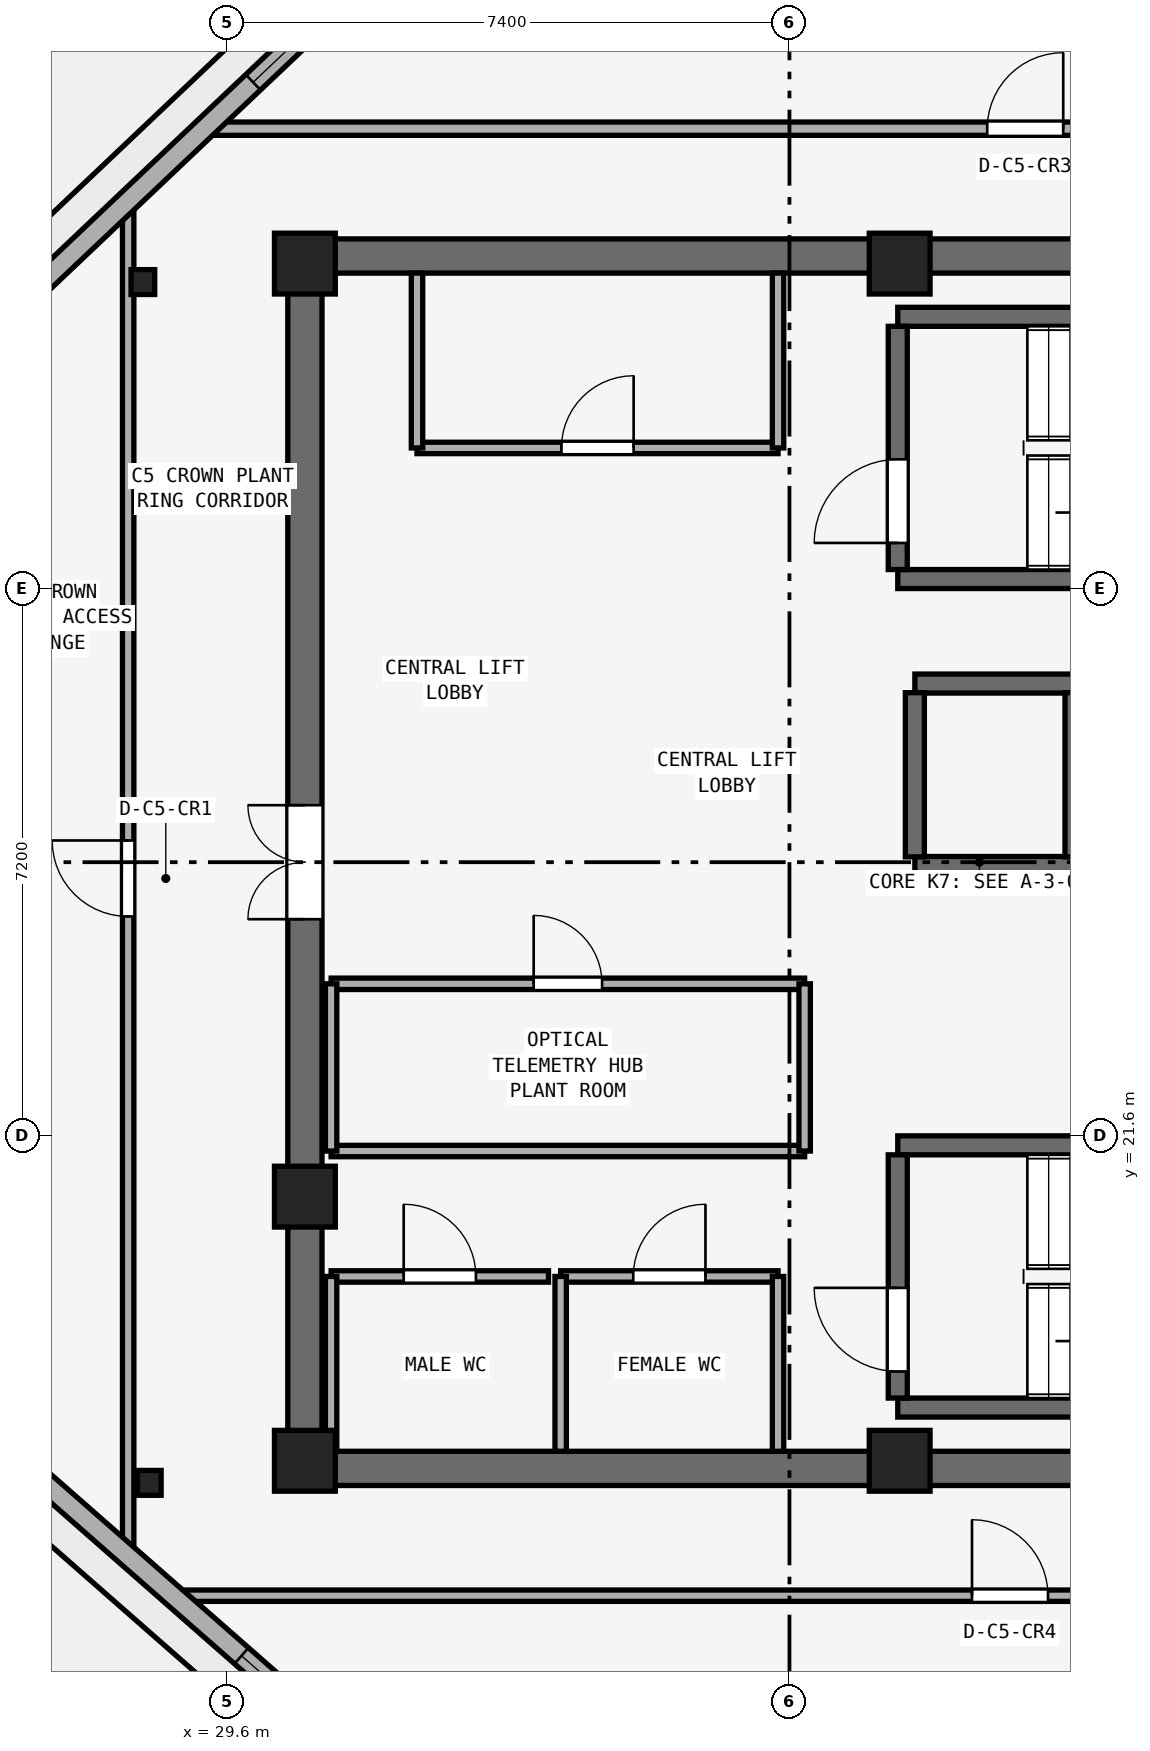
"""IFC4 building model, lengths in metres.
Left out: names, types, materials, properties, quantities, classifications, styles, units other than length and angle.
Written with IfcOpenShell. Run it as: python <this file> out.ifc"""

import sys

from ifc_helpers import new_model, si_unit, direction, frame, frame_2d, origin, origin_2d, place, context, subcontext, project, spatial, rectangle, i_section, extrude, element, fill, save


model = new_model("IFC4")
c1 = context("Model", 3, precision=1e-05, world=origin(), true_north=direction((0.0, 1.0)))
c2 = subcontext(c1, "Body", "Model", "MODEL_VIEW")
j1 = project(units=[si_unit("LENGTHUNIT", "METRE"), si_unit("PLANEANGLEUNIT", "RADIAN")], contexts=[c1])
p1 = place(None, origin())
s1 = spatial("IfcSite", under=j1, at=p1, CompositionType="ELEMENT")
p2 = place(p1, origin())
s2 = spatial("IfcBuilding", under=s1, at=p2, CompositionType="ELEMENT")
p3 = place(p2, frame((0.0, 0.0, 329.4)))
s3 = spatial("IfcBuildingStorey", under=s2, at=p3, CompositionType="ELEMENT", Elevation=329.4)
for number, where, z_axis, x_axis in (
    (1, (30.4, 17.225, 0.0), (0.0, 0.0, 1.0), (1.0, 0.0, 0.0)),
    (2, (30.4, 33.175, 0.0), (0.0, 0.0, 1.0), (1.0, 0.0, 0.0)),
):
    element("IfcWall", number, at=place(p3, frame(where, z_axis=z_axis, x_axis=x_axis)), inside=s3, PredefinedType="SHEAR", context=c2, shape_type="SweptSolid", body=[
        extrude(rectangle(XDim=18.2, YDim=0.45, at=frame_2d((9.1, 0.0))), origin(), (0.0, 0.0, 1.0), 3.72),
    ])
p4 = place(p3, frame((30.625, 17.45, 0.0), z_axis=(0.0, 0.0, 1.0), x_axis=(0.0, 1.0, 0.0)))
e3 = element("IfcWall", 3, at=p4, inside=s3, PredefinedType="SHEAR", context=c2, shape_type="SweptSolid", body=[
    extrude(rectangle(XDim=15.5, YDim=0.45, at=frame_2d((7.75, 0.0))), origin(), (0.0, 0.0, 1.0), 3.72),
])
p5 = place(p4, frame((7.0, 0.0, 0.0)))
e4 = element("IfcOpeningElement", 4, at=p5, cuts=e3, PredefinedType="OPENING", context=c2, shape_type="SweptSolid", body=[
    extrude(rectangle(XDim=1.5, YDim=2.15, at=frame_2d((0.75, 1.075))), frame((0.0, 0.235, 0.0), z_axis=(0.0, -1.0, 0.0), x_axis=(1.0, 0.0, 0.0)), (0.0, 0.0, 1.0), 0.47),
])
for number, where, z_axis, x_axis in (
    (5, (30.625, 17.325, 0.0), (0.0, 0.0, 1.0), (1.0, 0.0, 0.0)),
    (6, (38.45, 17.325, 0.0), (0.0, 0.0, 1.0), (1.0, 0.0, 0.0)),
    (7, (38.45, 33.075, 0.0), (0.0, 0.0, 1.0), (1.0, 0.0, 0.0)),
    (8, (30.625, 33.075, 0.0), (0.0, 0.0, 1.0), (1.0, 0.0, 0.0)),
    (9, (30.625, 20.8, 0.0), (0.0, 0.0, 1.0), (1.0, 0.0, 0.0)),
):
    element("IfcColumn", number, at=place(p3, frame(where, z_axis=z_axis, x_axis=x_axis)), inside=s3, PredefinedType="PILASTER", context=c2, shape_type="SweptSolid", body=[
        extrude(rectangle(XDim=0.8, YDim=0.8, at=origin_2d()), origin(), (0.0, 0.0, 1.0), 4.0),
    ])
for number, where, z_axis, x_axis in (
    (10, (28.493, 32.832, 0.0), (0.0, 0.0, 1.0), (1.0, 0.0, 0.0)),
    (11, (28.578, 17.035, 0.0), (0.0, 0.0, 1.0), (1.0, 0.0, 0.0)),
):
    element("IfcColumn", number, at=place(p3, frame(where, z_axis=z_axis, x_axis=x_axis)), inside=s3, PredefinedType="COLUMN", context=c2, shape_type="SweptSolid", body=[
        extrude(i_section(OverallWidth=0.311, OverallDepth=0.327, WebThickness=0.016, FlangeThickness=0.025, at=origin_2d()), origin(), (0.0, 0.0, 1.0), 4.0),
    ])
for number, where, z_axis, x_axis in (
    (12, (38.425, 28.925, 0.0), (0.0, 0.0, 1.0), (1.0, 0.0, 0.0)),
    (13, (38.425, 32.375, 0.0), (0.0, 0.0, 1.0), (1.0, 0.0, 0.0)),
):
    element("IfcWall", number, at=place(p3, frame(where, z_axis=z_axis, x_axis=x_axis)), inside=s3, PredefinedType="SHEAR", context=c2, shape_type="SweptSolid", body=[
        extrude(rectangle(XDim=7.3, YDim=0.25, at=frame_2d((3.65, 0.0))), origin(), (0.0, 0.0, 1.0), 3.72),
    ])
p6 = place(p3, frame((38.425, 29.05, 0.0), z_axis=(0.0, 0.0, 1.0), x_axis=(0.0, 1.0, 0.0)))
e14 = element("IfcWall", 14, at=p6, inside=s3, PredefinedType="SHEAR", context=c2, shape_type="SweptSolid", body=[
    extrude(rectangle(XDim=3.2, YDim=0.25, at=frame_2d((1.6, 0.0))), origin(), (0.0, 0.0, 1.0), 3.72),
])
p7 = place(p6, frame((0.35, 0.0, 0.0)))
e15 = element("IfcOpeningElement", 15, at=p7, cuts=e14, PredefinedType="OPENING", context=c2, shape_type="SweptSolid", body=[
    extrude(rectangle(XDim=1.1, YDim=2.15, at=frame_2d((0.55, 1.075))), frame((0.0, 0.135, 0.0), z_axis=(0.0, -1.0, 0.0), x_axis=(1.0, 0.0, 0.0)), (0.0, 0.0, 1.0), 0.27),
])
for number, where, z_axis, x_axis in (
    (16, (38.425, 18.025, 0.0), (0.0, 0.0, 1.0), (1.0, 0.0, 0.0)),
    (17, (38.425, 21.475, 0.0), (0.0, 0.0, 1.0), (1.0, 0.0, 0.0)),
):
    element("IfcWall", number, at=place(p3, frame(where, z_axis=z_axis, x_axis=x_axis)), inside=s3, PredefinedType="SHEAR", context=c2, shape_type="SweptSolid", body=[
        extrude(rectangle(XDim=7.3, YDim=0.25, at=frame_2d((3.65, 0.0))), origin(), (0.0, 0.0, 1.0), 3.72),
    ])
p8 = place(p3, frame((38.425, 18.15, 0.0), z_axis=(0.0, 0.0, 1.0), x_axis=(0.0, 1.0, 0.0)))
e18 = element("IfcWall", 18, at=p8, inside=s3, PredefinedType="SHEAR", context=c2, shape_type="SweptSolid", body=[
    extrude(rectangle(XDim=3.2, YDim=0.25, at=frame_2d((1.6, 0.0))), origin(), (0.0, 0.0, 1.0), 3.72),
])
p9 = place(p8, frame((0.35, 0.0, 0.0)))
e19 = element("IfcOpeningElement", 19, at=p9, cuts=e18, PredefinedType="OPENING", context=c2, shape_type="SweptSolid", body=[
    extrude(rectangle(XDim=1.1, YDim=2.15, at=frame_2d((0.55, 1.075))), frame((0.0, 0.135, 0.0), z_axis=(0.0, -1.0, 0.0), x_axis=(1.0, 0.0, 0.0)), (0.0, 0.0, 1.0), 0.27),
])
for number, where, z_axis, x_axis in (
    (20, (38.65, 25.15, 0.0), (0.0, 0.0, 1.0), (1.0, 0.0, 0.0)),
    (21, (38.65, 27.55, 0.0), (0.0, 0.0, 1.0), (1.0, 0.0, 0.0)),
):
    element("IfcWall", number, at=place(p3, frame(where, z_axis=z_axis, x_axis=x_axis)), inside=s3, PredefinedType="SHEAR", context=c2, shape_type="SweptSolid", body=[
        extrude(rectangle(XDim=2.1, YDim=0.25, at=frame_2d((1.05, 0.0))), origin(), (0.0, 0.0, 1.0), 3.72),
    ])
for number, where, z_axis, x_axis in (
    (22, (38.65, 25.27, 0.0), (0.0, 0.0, 1.0), (0.0, 1.0, 0.0)),
    (23, (40.75, 25.27, 0.0), (0.0, 0.0, 1.0), (0.0, 1.0, 0.0)),
):
    element("IfcWall", number, at=place(p3, frame(where, z_axis=z_axis, x_axis=x_axis)), inside=s3, PredefinedType="SHEAR", context=c2, shape_type="SweptSolid", body=[
        extrude(rectangle(XDim=2.16, YDim=0.25, at=frame_2d((1.08, 0.0))), origin(), (0.0, 0.0, 1.0), 3.72),
    ])
p10 = place(p3, frame((32.1, 30.65, 0.0), z_axis=(0.0, 0.0, 1.0), x_axis=(1.0, 0.0, 0.0)))
e24 = element("IfcWall", 24, at=p10, inside=s3, PredefinedType="PARTITIONING", context=c2, shape_type="SweptSolid", body=[
    extrude(rectangle(XDim=4.75, YDim=0.15, at=frame_2d((2.375, 0.0))), origin(), (0.0, 0.0, 1.0), 3.72),
])
p11 = place(p10, frame((1.9, 0.0, 0.0)))
e25 = element("IfcOpeningElement", 25, at=p11, cuts=e24, PredefinedType="OPENING", context=c2, shape_type="SweptSolid", body=[
    extrude(rectangle(XDim=0.95, YDim=2.1, at=frame_2d((0.475, 1.05))), frame((0.0, 0.085, 0.0), z_axis=(0.0, -1.0, 0.0), x_axis=(1.0, 0.0, 0.0)), (0.0, 0.0, 1.0), 0.17),
])
for number, where, z_axis, x_axis in (
    (26, (32.1, 30.65, 0.0), (0.0, 0.0, 1.0), (0.0, 1.0, 0.0)),
    (27, (36.85, 30.65, 0.0), (0.0, 0.0, 1.0), (0.0, 1.0, 0.0)),
):
    element("IfcWall", number, at=place(p3, frame(where, z_axis=z_axis, x_axis=x_axis)), inside=s3, PredefinedType="PARTITIONING", context=c2, shape_type="SweptSolid", body=[
        extrude(rectangle(XDim=2.3, YDim=0.15, at=frame_2d((1.15, 0.0))), origin(), (0.0, 0.0, 1.0), 3.72),
    ])
p12 = place(p3, frame((30.97, 19.75, 0.0), z_axis=(0.0, 0.0, 1.0), x_axis=(1.0, 0.0, 0.0)))
e28 = element("IfcWall", 28, at=p12, inside=s3, PredefinedType="PARTITIONING", context=c2, shape_type="SweptSolid", body=[
    extrude(rectangle(XDim=2.86, YDim=0.15, at=frame_2d((1.43, 0.0))), origin(), (0.0, 0.0, 1.0), 3.72),
])
p13 = place(p12, frame((0.955, 0.0, 0.0)))
e29 = element("IfcOpeningElement", 29, at=p13, cuts=e28, PredefinedType="OPENING", context=c2, shape_type="SweptSolid", body=[
    extrude(rectangle(XDim=0.95, YDim=2.1, at=frame_2d((0.475, 1.05))), frame((0.0, 0.085, 0.0), z_axis=(0.0, -1.0, 0.0), x_axis=(1.0, 0.0, 0.0)), (0.0, 0.0, 1.0), 0.17),
])
p14 = place(p3, frame((30.97, 17.45, 0.0), z_axis=(0.0, 0.0, 1.0), x_axis=(0.0, 1.0, 0.0)))
e30 = element("IfcWall", 30, at=p14, inside=s3, PredefinedType="PARTITIONING", context=c2, shape_type="SweptSolid", body=[
    extrude(rectangle(XDim=2.3, YDim=0.15, at=frame_2d((1.15, 0.0))), origin(), (0.0, 0.0, 1.0), 2.82),
])
p15 = place(p3, frame((33.99, 19.75, 0.0), z_axis=(0.0, 0.0, 1.0), x_axis=(1.0, 0.0, 0.0)))
e31 = element("IfcWall", 31, at=p15, inside=s3, PredefinedType="PARTITIONING", context=c2, shape_type="SweptSolid", body=[
    extrude(rectangle(XDim=2.86, YDim=0.15, at=frame_2d((1.43, 0.0))), origin(), (0.0, 0.0, 1.0), 3.72),
])
p16 = place(p15, frame((0.955, 0.0, 0.0)))
e32 = element("IfcOpeningElement", 32, at=p16, cuts=e31, PredefinedType="OPENING", context=c2, shape_type="SweptSolid", body=[
    extrude(rectangle(XDim=0.95, YDim=2.1, at=frame_2d((0.475, 1.05))), frame((0.0, 0.085, 0.0), z_axis=(0.0, -1.0, 0.0), x_axis=(1.0, 0.0, 0.0)), (0.0, 0.0, 1.0), 0.17),
])
for number, where, z_axis, x_axis in (
    (33, (33.99, 17.45, 0.0), (0.0, 0.0, 1.0), (0.0, 1.0, 0.0)),
    (34, (36.85, 17.45, 0.0), (0.0, 0.0, 1.0), (0.0, 1.0, 0.0)),
):
    element("IfcWall", number, at=place(p3, frame(where, z_axis=z_axis, x_axis=x_axis)), inside=s3, PredefinedType="PARTITIONING", context=c2, shape_type="SweptSolid", body=[
        extrude(rectangle(XDim=2.3, YDim=0.15, at=frame_2d((1.15, 0.0))), origin(), (0.0, 0.0, 1.0), 3.72),
    ])
p17 = place(p3, frame((30.97, 21.4, 0.0), z_axis=(0.0, 0.0, 1.0), x_axis=(1.0, 0.0, 0.0)))
e35 = element("IfcWall", 35, at=p17, inside=s3, PredefinedType="PARTITIONING", context=c2, shape_type="SweptSolid", body=[
    extrude(rectangle(XDim=6.23, YDim=0.15, at=frame_2d((3.115, 0.0))), origin(), (0.0, 0.0, 1.0), 3.72),
])
p18 = place(p3, frame((30.97, 23.6, 0.0), z_axis=(0.0, 0.0, 1.0), x_axis=(1.0, 0.0, 0.0)))
e36 = element("IfcWall", 36, at=p18, inside=s3, PredefinedType="PARTITIONING", context=c2, shape_type="SweptSolid", body=[
    extrude(rectangle(XDim=6.23, YDim=0.15, at=frame_2d((3.115, 0.0))), origin(), (0.0, 0.0, 1.0), 3.72),
])
p19 = place(p18, frame((2.665, 0.0, 0.0)))
e37 = element("IfcOpeningElement", 37, at=p19, cuts=e36, PredefinedType="OPENING", context=c2, shape_type="SweptSolid", body=[
    extrude(rectangle(XDim=0.9, YDim=2.1, at=frame_2d((0.45, 1.05))), frame((0.0, 0.085, 0.0), z_axis=(0.0, -1.0, 0.0), x_axis=(1.0, 0.0, 0.0)), (0.0, 0.0, 1.0), 0.17),
])
p20 = place(p3, frame((30.97, 21.4, 0.0), z_axis=(0.0, 0.0, 1.0), x_axis=(0.0, 1.0, 0.0)))
e38 = element("IfcWall", 38, at=p20, inside=s3, PredefinedType="PARTITIONING", context=c2, shape_type="SweptSolid", body=[
    extrude(rectangle(XDim=2.2, YDim=0.15, at=frame_2d((1.1, 0.0))), origin(), (0.0, 0.0, 1.0), 2.82),
])
p21 = place(p3, frame((37.2, 21.4, 0.0), z_axis=(0.0, 0.0, 1.0), x_axis=(0.0, 1.0, 0.0)))
e39 = element("IfcWall", 39, at=p21, inside=s3, PredefinedType="PARTITIONING", context=c2, shape_type="SweptSolid", body=[
    extrude(rectangle(XDim=2.2, YDim=0.15, at=frame_2d((1.1, 0.0))), origin(), (0.0, 0.0, 1.0), 3.72),
])
p22 = place(p3, frame((28.3, 16.022, 0.0), z_axis=(0.0, 0.0, 1.0), x_axis=(0.0, 1.0, 0.0)))
e40 = element("IfcWall", 40, at=p22, inside=s3, PredefinedType="PARTITIONING", context=c2, shape_type="SweptSolid", body=[
    extrude(rectangle(XDim=17.933, YDim=0.15, at=frame_2d((8.967, 0.0))), origin(), (0.0, 0.0, 1.0), 3.176),
])
p23 = place(p22, frame((8.464, 0.0, 0.0)))
e41 = element("IfcOpeningElement", 41, at=p23, cuts=e40, PredefinedType="OPENING", context=c2, shape_type="SweptSolid", body=[
    extrude(rectangle(XDim=1.0, YDim=2.12, at=frame_2d((0.5, 1.06))), frame((0.0, 0.085, 0.0), z_axis=(0.0, -1.0, 0.0), x_axis=(1.0, 0.0, 0.0)), (0.0, 0.0, 1.0), 0.17),
])
p24 = place(p3, frame((28.818, 15.55, 0.0), z_axis=(0.0, 0.0, 1.0), x_axis=(1.0, 0.0, 0.0)))
e42 = element("IfcWall", 42, at=p24, inside=s3, PredefinedType="PARTITIONING", context=c2, shape_type="SweptSolid", body=[
    extrude(rectangle(XDim=23.98, YDim=0.15, at=frame_2d((11.99, 0.0))), origin(), (0.0, 0.0, 1.0), 3.72),
])
p25 = place(p24, frame((10.583, 0.0, 0.0)))
e43 = element("IfcOpeningElement", 43, at=p25, cuts=e42, PredefinedType="OPENING", context=c2, shape_type="SweptSolid", body=[
    extrude(rectangle(XDim=1.0, YDim=2.12, at=frame_2d((0.5, 1.06))), frame((0.0, 0.085, 0.0), z_axis=(0.0, -1.0, 0.0), x_axis=(1.0, 0.0, 0.0)), (0.0, 0.0, 1.0), 0.17),
])
p26 = place(p3, frame((29.236, 34.85, 0.0), z_axis=(0.0, 0.0, 1.0), x_axis=(1.0, 0.0, 0.0)))
e44 = element("IfcWall", 44, at=p26, inside=s3, PredefinedType="PARTITIONING", context=c2, shape_type="SweptSolid", body=[
    extrude(rectangle(XDim=24.422, YDim=0.175, at=frame_2d((12.211, 0.0))), origin(), (0.0, 0.0, 1.0), 3.72),
])
p27 = place(p26, frame((10.365, 0.0, 0.0)))
e45 = element("IfcOpeningElement", 45, at=p27, cuts=e44, PredefinedType="OPENING", context=c2, shape_type="SweptSolid", body=[
    extrude(rectangle(XDim=1.0, YDim=2.12, at=frame_2d((0.5, 1.06))), frame((0.0, 0.097, 0.0), z_axis=(0.0, -1.0, 0.0), x_axis=(1.0, 0.0, 0.0)), (0.0, 0.0, 1.0), 0.195),
])
p28 = place(p3, frame((33.654, 38.976, 0.0), z_axis=(0.0, 0.0, 1.0), x_axis=(-0.72588023988, -0.687821108539, 0.0)))
e46 = element("IfcWall", 46, at=p28, inside=s3, PredefinedType="STANDARD", context=c2, shape_type="SweptSolid", body=[
    extrude(rectangle(XDim=9.122, YDim=0.28, at=frame_2d((4.561, 0.0))), origin(), (0.0, 0.0, 1.0), 3.72),
])
p29 = place(p28, frame((1.054, 0.0, 0.9)))
e47 = element("IfcOpeningElement", 47, at=p29, cuts=e46, PredefinedType="OPENING", context=c2, shape_type="SweptSolid", body=[
    extrude(rectangle(XDim=1.6, YDim=1.45, at=frame_2d((0.8, 0.725))), frame((0.0, 0.15, 0.0), z_axis=(0.0, -1.0, 0.0), x_axis=(1.0, 0.0, 0.0)), (0.0, 0.0, 1.0), 0.3),
])
p30 = place(p28, frame((3.511, 0.0, 0.9)))
e48 = element("IfcOpeningElement", 48, at=p30, cuts=e46, PredefinedType="OPENING", context=c2, shape_type="SweptSolid", body=[
    extrude(rectangle(XDim=1.6, YDim=1.45, at=frame_2d((0.8, 0.725))), frame((0.0, 0.15, 0.0), z_axis=(0.0, -1.0, 0.0), x_axis=(1.0, 0.0, 0.0)), (0.0, 0.0, 1.0), 0.3),
])
p31 = place(p3, frame((27.114, 17.109, 0.0), z_axis=(0.0, 0.0, 1.0), x_axis=(0.751684867815, -0.659522448062, 0.0)))
e49 = element("IfcWall", 49, at=p31, inside=s3, PredefinedType="STANDARD", context=c2, shape_type="SweptSolid", body=[
    extrude(rectangle(XDim=8.723, YDim=0.28, at=frame_2d((4.362, 0.0))), origin(), (0.0, 0.0, 1.0), 3.72),
])
p32 = place(p31, frame((3.562, 0.0, 0.9)))
e50 = element("IfcOpeningElement", 50, at=p32, cuts=e49, PredefinedType="OPENING", context=c2, shape_type="SweptSolid", body=[
    extrude(rectangle(XDim=1.6, YDim=1.45, at=frame_2d((0.8, 0.725))), frame((0.0, 0.15, 0.0), z_axis=(0.0, -1.0, 0.0), x_axis=(1.0, 0.0, 0.0)), (0.0, 0.0, 1.0), 0.3),
])
p33 = place(p31, frame((6.136, 0.0, 0.9)))
e51 = element("IfcOpeningElement", 51, at=p33, cuts=e49, PredefinedType="OPENING", context=c2, shape_type="SweptSolid", body=[
    extrude(rectangle(XDim=1.6, YDim=1.45, at=frame_2d((0.8, 0.725))), frame((0.0, 0.15, 0.0), z_axis=(0.0, -1.0, 0.0), x_axis=(1.0, 0.0, 0.0)), (0.0, 0.0, 1.0), 0.3),
])
p34 = place(p7, origin())
e52 = element("IfcDoor", 52, at=p34, inside=s3, OperationType="SINGLE_SWING_LEFT", PredefinedType="DOOR", context=c2, shape_type="SweptSolid", body=[
    extrude(rectangle(XDim=1.1, YDim=2.15, at=frame_2d((0.55, 1.075))), frame((0.0, 0.025, 0.0), z_axis=(0.0, -1.0, 0.0), x_axis=(1.0, 0.0, 0.0)), (0.0, 0.0, 1.0), 0.05),
])
fill(e15, e52)
p35 = place(p9, origin())
e53 = element("IfcDoor", 53, at=p35, inside=s3, OperationType="SINGLE_SWING_RIGHT", PredefinedType="DOOR", context=c2, shape_type="SweptSolid", body=[
    extrude(rectangle(XDim=1.1, YDim=2.15, at=frame_2d((0.55, 1.075))), frame((0.0, 0.025, 0.0), z_axis=(0.0, -1.0, 0.0), x_axis=(1.0, 0.0, 0.0)), (0.0, 0.0, 1.0), 0.05),
])
fill(e19, e53)
p36 = place(p5, origin())
e54 = element("IfcDoor", 54, at=p36, inside=s3, OperationType="DOUBLE_DOOR_SINGLE_SWING", PredefinedType="DOOR", context=c2, shape_type="SweptSolid", body=[
    extrude(rectangle(XDim=1.5, YDim=2.15, at=frame_2d((0.75, 1.075))), frame((0.0, 0.025, 0.0), z_axis=(0.0, -1.0, 0.0), x_axis=(1.0, 0.0, 0.0)), (0.0, 0.0, 1.0), 0.05),
])
fill(e4, e54)
p37 = place(p11, origin())
e55 = element("IfcDoor", 55, at=p37, inside=s3, OperationType="SINGLE_SWING_RIGHT", PredefinedType="DOOR", context=c2, shape_type="SweptSolid", body=[
    extrude(rectangle(XDim=0.95, YDim=2.1, at=frame_2d((0.475, 1.05))), frame((0.0, 0.025, 0.0), z_axis=(0.0, -1.0, 0.0), x_axis=(1.0, 0.0, 0.0)), (0.0, 0.0, 1.0), 0.05),
])
fill(e25, e55)
p38 = place(p13, origin())
e56 = element("IfcDoor", 56, at=p38, inside=s3, OperationType="SINGLE_SWING_LEFT", PredefinedType="DOOR", context=c2, shape_type="SweptSolid", body=[
    extrude(rectangle(XDim=0.95, YDim=2.1, at=frame_2d((0.475, 1.05))), frame((0.0, 0.025, 0.0), z_axis=(0.0, -1.0, 0.0), x_axis=(1.0, 0.0, 0.0)), (0.0, 0.0, 1.0), 0.05),
])
fill(e29, e56)
p39 = place(p16, origin())
e57 = element("IfcDoor", 57, at=p39, inside=s3, OperationType="SINGLE_SWING_RIGHT", PredefinedType="DOOR", context=c2, shape_type="SweptSolid", body=[
    extrude(rectangle(XDim=0.95, YDim=2.1, at=frame_2d((0.475, 1.05))), frame((0.0, 0.025, 0.0), z_axis=(0.0, -1.0, 0.0), x_axis=(1.0, 0.0, 0.0)), (0.0, 0.0, 1.0), 0.05),
])
fill(e32, e57)
p40 = place(p19, origin())
e58 = element("IfcDoor", 58, at=p40, inside=s3, OperationType="SINGLE_SWING_LEFT", PredefinedType="DOOR", context=c2, shape_type="SweptSolid", body=[
    extrude(rectangle(XDim=0.9, YDim=2.1, at=frame_2d((0.45, 1.05))), frame((0.0, 0.025, 0.0), z_axis=(0.0, -1.0, 0.0), x_axis=(1.0, 0.0, 0.0)), (0.0, 0.0, 1.0), 0.05),
])
fill(e37, e58)
p41 = place(p23, origin())
e59 = element("IfcDoor", 59, at=p41, inside=s3, OperationType="SINGLE_SWING_RIGHT", PredefinedType="DOOR", context=c2, shape_type="SweptSolid", body=[
    extrude(rectangle(XDim=1.0, YDim=2.12, at=frame_2d((0.5, 1.06))), frame((0.0, 0.025, 0.0), z_axis=(0.0, -1.0, 0.0), x_axis=(1.0, 0.0, 0.0)), (0.0, 0.0, 1.0), 0.05),
])
fill(e41, e59)
p42 = place(p27, origin())
e60 = element("IfcDoor", 60, at=p42, inside=s3, OperationType="SINGLE_SWING_RIGHT", PredefinedType="DOOR", context=c2, shape_type="SweptSolid", body=[
    extrude(rectangle(XDim=1.0, YDim=2.12, at=frame_2d((0.5, 1.06))), frame((0.0, 0.025, 0.0), z_axis=(0.0, -1.0, 0.0), x_axis=(1.0, 0.0, 0.0)), (0.0, 0.0, 1.0), 0.05),
])
fill(e45, e60)
p43 = place(p25, origin())
e61 = element("IfcDoor", 61, at=p43, inside=s3, OperationType="SINGLE_SWING_LEFT", PredefinedType="DOOR", context=c2, shape_type="SweptSolid", body=[
    extrude(rectangle(XDim=1.0, YDim=2.12, at=frame_2d((0.5, 1.06))), frame((0.0, 0.025, 0.0), z_axis=(0.0, -1.0, 0.0), x_axis=(1.0, 0.0, 0.0)), (0.0, 0.0, 1.0), 0.05),
])
fill(e43, e61)
p44 = place(p30, origin())
e62 = element("IfcWindow", 62, at=p44, inside=s3, PartitioningType="SINGLE_PANEL", PredefinedType="WINDOW", context=c2, shape_type="SweptSolid", body=[
    extrude(rectangle(XDim=1.6, YDim=1.45, at=frame_2d((0.8, 0.725))), frame((0.0, 0.03, 0.0), z_axis=(0.0, -1.0, 0.0), x_axis=(1.0, 0.0, 0.0)), (0.0, 0.0, 1.0), 0.06),
])
fill(e48, e62)
p45 = place(p32, origin())
e63 = element("IfcWindow", 63, at=p45, inside=s3, PartitioningType="SINGLE_PANEL", PredefinedType="WINDOW", context=c2, shape_type="SweptSolid", body=[
    extrude(rectangle(XDim=1.6, YDim=1.45, at=frame_2d((0.8, 0.725))), frame((0.0, 0.03, 0.0), z_axis=(0.0, -1.0, 0.0), x_axis=(1.0, 0.0, 0.0)), (0.0, 0.0, 1.0), 0.06),
])
fill(e50, e63)
save(model, sys.argv[1])
